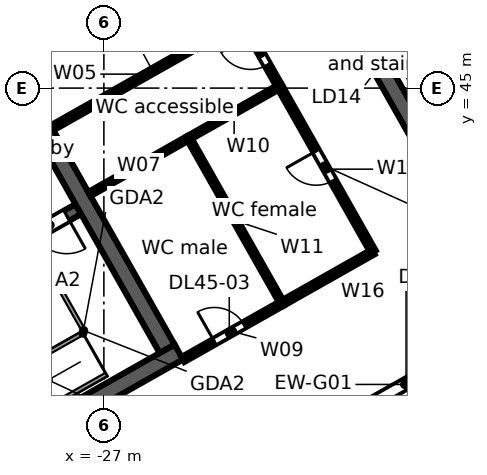
"""IFC4 building model, lengths in metres.
Left out: names, types, materials, properties, quantities, classifications, styles, units other than length and angle.
Written with IfcOpenShell. Run it as: python <this file> out.ifc"""

import sys

from ifc_helpers import new_model, si_unit, direction, frame, frame_2d, origin, place, context, subcontext, project, spatial, rectangle, extrude, element, fill, save


model = new_model("IFC4")
c1 = context("Model", 3, precision=1e-05, world=origin(), true_north=direction((0.0, 1.0)))
c2 = subcontext(c1, "Body", "Model", "MODEL_VIEW")
j1 = project(units=[si_unit("LENGTHUNIT", "METRE"), si_unit("PLANEANGLEUNIT", "RADIAN")], contexts=[c1])
p1 = place(None, origin())
s1 = spatial("IfcSite", under=j1, at=p1, CompositionType="ELEMENT")
p2 = place(p1, origin())
s2 = spatial("IfcBuilding", under=s1, at=p2, CompositionType="ELEMENT")
p3 = place(p2, frame((0.0, 0.0, 207.5)))
s3 = spatial("IfcBuildingStorey", under=s2, at=p3, CompositionType="ELEMENT", Elevation=207.5)
p4 = place(p3, frame((-0.046, 47.974, 0.0), z_axis=(0.0, 0.0, 1.0), x_axis=(-0.870356579543, -0.492421998337, 0.0)))
e1 = element("IfcWall", 1, at=p4, inside=s3, PredefinedType="STANDARD", context=c2, shape_type="SweptSolid", body=[
    extrude(rectangle(XDim=43.754, YDim=0.25, at=frame_2d((21.877, 0.0))), origin(), (0.0, 0.0, 1.0), 3.62),
])
p5 = place(p4, frame((41.061, 0.0, 0.8)))
e2 = element("IfcOpeningElement", 2, at=p5, cuts=e1, PredefinedType="OPENING", context=c2, shape_type="SweptSolid", body=[
    extrude(rectangle(XDim=2.4, YDim=2.2, at=frame_2d((1.2, 1.1))), frame((0.0, 0.135, 0.0), z_axis=(0.0, -1.0, 0.0), x_axis=(1.0, 0.0, 0.0)), (0.0, 0.0, 1.0), 0.27),
])
p6 = place(p4, frame((38.443, 0.0, 0.0)))
e3 = element("IfcOpeningElement", 3, at=p6, cuts=e1, PredefinedType="OPENING", context=c2, shape_type="SweptSolid", body=[
    extrude(rectangle(XDim=1.8, YDim=2.4, at=frame_2d((0.9, 1.2))), frame((0.0, 0.135, 0.0), z_axis=(0.0, -1.0, 0.0), x_axis=(1.0, 0.0, 0.0)), (0.0, 0.0, 1.0), 0.27),
])
p7 = place(p4, frame((35.225, 0.0, 0.8)))
e4 = element("IfcOpeningElement", 4, at=p7, cuts=e1, PredefinedType="OPENING", context=c2, shape_type="SweptSolid", body=[
    extrude(rectangle(XDim=2.4, YDim=2.2, at=frame_2d((1.2, 1.1))), frame((0.0, 0.135, 0.0), z_axis=(0.0, -1.0, 0.0), x_axis=(1.0, 0.0, 0.0)), (0.0, 0.0, 1.0), 0.27),
])
p8 = place(p4, frame((32.307, 0.0, 0.8)))
e5 = element("IfcOpeningElement", 5, at=p8, cuts=e1, PredefinedType="OPENING", context=c2, shape_type="SweptSolid", body=[
    extrude(rectangle(XDim=2.4, YDim=2.2, at=frame_2d((1.2, 1.1))), frame((0.0, 0.135, 0.0), z_axis=(0.0, -1.0, 0.0), x_axis=(1.0, 0.0, 0.0)), (0.0, 0.0, 1.0), 0.27),
])
p9 = place(p4, frame((29.688, 0.0, 0.0)))
e6 = element("IfcOpeningElement", 6, at=p9, cuts=e1, PredefinedType="OPENING", context=c2, shape_type="SweptSolid", body=[
    extrude(rectangle(XDim=1.8, YDim=2.4, at=frame_2d((0.9, 1.2))), frame((0.0, 0.135, 0.0), z_axis=(0.0, -1.0, 0.0), x_axis=(1.0, 0.0, 0.0)), (0.0, 0.0, 1.0), 0.27),
])
p10 = place(p4, frame((26.47, 0.0, 0.8)))
e7 = element("IfcOpeningElement", 7, at=p10, cuts=e1, PredefinedType="OPENING", context=c2, shape_type="SweptSolid", body=[
    extrude(rectangle(XDim=2.4, YDim=2.2, at=frame_2d((1.2, 1.1))), frame((0.0, 0.135, 0.0), z_axis=(0.0, -1.0, 0.0), x_axis=(1.0, 0.0, 0.0)), (0.0, 0.0, 1.0), 0.27),
])
p11 = place(p4, frame((23.552, 0.0, 0.8)))
e8 = element("IfcOpeningElement", 8, at=p11, cuts=e1, PredefinedType="OPENING", context=c2, shape_type="SweptSolid", body=[
    extrude(rectangle(XDim=2.4, YDim=2.2, at=frame_2d((1.2, 1.1))), frame((0.0, 0.135, 0.0), z_axis=(0.0, -1.0, 0.0), x_axis=(1.0, 0.0, 0.0)), (0.0, 0.0, 1.0), 0.27),
])
p12 = place(p4, frame((20.934, 0.0, 0.0)))
e9 = element("IfcOpeningElement", 9, at=p12, cuts=e1, PredefinedType="OPENING", context=c2, shape_type="SweptSolid", body=[
    extrude(rectangle(XDim=1.8, YDim=2.4, at=frame_2d((0.9, 1.2))), frame((0.0, 0.135, 0.0), z_axis=(0.0, -1.0, 0.0), x_axis=(1.0, 0.0, 0.0)), (0.0, 0.0, 1.0), 0.27),
])
p13 = place(p4, frame((17.716, 0.0, 0.8)))
e10 = element("IfcOpeningElement", 10, at=p13, cuts=e1, PredefinedType="OPENING", context=c2, shape_type="SweptSolid", body=[
    extrude(rectangle(XDim=2.4, YDim=2.2, at=frame_2d((1.2, 1.1))), frame((0.0, 0.135, 0.0), z_axis=(0.0, -1.0, 0.0), x_axis=(1.0, 0.0, 0.0)), (0.0, 0.0, 1.0), 0.27),
])
p14 = place(p4, frame((14.798, 0.0, 0.8)))
e11 = element("IfcOpeningElement", 11, at=p14, cuts=e1, PredefinedType="OPENING", context=c2, shape_type="SweptSolid", body=[
    extrude(rectangle(XDim=2.4, YDim=2.2, at=frame_2d((1.2, 1.1))), frame((0.0, 0.135, 0.0), z_axis=(0.0, -1.0, 0.0), x_axis=(1.0, 0.0, 0.0)), (0.0, 0.0, 1.0), 0.27),
])
p15 = place(p4, frame((12.179, 0.0, 0.0)))
e12 = element("IfcOpeningElement", 12, at=p15, cuts=e1, PredefinedType="OPENING", context=c2, shape_type="SweptSolid", body=[
    extrude(rectangle(XDim=1.8, YDim=2.4, at=frame_2d((0.9, 1.2))), frame((0.0, 0.135, 0.0), z_axis=(0.0, -1.0, 0.0), x_axis=(1.0, 0.0, 0.0)), (0.0, 0.0, 1.0), 0.27),
])
p16 = place(p4, frame((8.961, 0.0, 0.8)))
e13 = element("IfcOpeningElement", 13, at=p16, cuts=e1, PredefinedType="OPENING", context=c2, shape_type="SweptSolid", body=[
    extrude(rectangle(XDim=2.4, YDim=2.2, at=frame_2d((1.2, 1.1))), frame((0.0, 0.135, 0.0), z_axis=(0.0, -1.0, 0.0), x_axis=(1.0, 0.0, 0.0)), (0.0, 0.0, 1.0), 0.27),
])
p17 = place(p4, frame((6.043, 0.0, 0.8)))
e14 = element("IfcOpeningElement", 14, at=p17, cuts=e1, PredefinedType="OPENING", context=c2, shape_type="SweptSolid", body=[
    extrude(rectangle(XDim=2.4, YDim=2.2, at=frame_2d((1.2, 1.1))), frame((0.0, 0.135, 0.0), z_axis=(0.0, -1.0, 0.0), x_axis=(1.0, 0.0, 0.0)), (0.0, 0.0, 1.0), 0.27),
])
p18 = place(p4, frame((3.425, 0.0, 0.0)))
e15 = element("IfcOpeningElement", 15, at=p18, cuts=e1, PredefinedType="OPENING", context=c2, shape_type="SweptSolid", body=[
    extrude(rectangle(XDim=1.8, YDim=2.4, at=frame_2d((0.9, 1.2))), frame((0.0, 0.135, 0.0), z_axis=(0.0, -1.0, 0.0), x_axis=(1.0, 0.0, 0.0)), (0.0, 0.0, 1.0), 0.27),
])
p19 = place(p4, frame((0.207, 0.0, 0.8)))
e16 = element("IfcOpeningElement", 16, at=p19, cuts=e1, PredefinedType="OPENING", context=c2, shape_type="SweptSolid", body=[
    extrude(rectangle(XDim=2.4, YDim=2.2, at=frame_2d((1.2, 1.1))), frame((0.0, 0.135, 0.0), z_axis=(0.0, -1.0, 0.0), x_axis=(1.0, 0.0, 0.0)), (0.0, 0.0, 1.0), 0.27),
])
p20 = place(p3, frame((-58.732, 38.771, 0.0), z_axis=(0.0, 0.0, 1.0), x_axis=(0.870354824205, 0.492425100887, 0.0)))
e17 = element("IfcWall", 17, at=p20, inside=s3, PredefinedType="STANDARD", context=c2, shape_type="SweptSolid", body=[
    extrude(rectangle(XDim=64.006, YDim=0.25, at=frame_2d((32.003, 0.0))), origin(), (0.0, 0.0, 1.0), 3.62),
])
p21 = place(p20, frame((61.259, 0.0, 0.8)))
e18 = element("IfcOpeningElement", 18, at=p21, cuts=e17, PredefinedType="OPENING", context=c2, shape_type="SweptSolid", body=[
    extrude(rectangle(XDim=2.4, YDim=2.2, at=frame_2d((1.2, 1.1))), frame((0.0, 0.135, 0.0), z_axis=(0.0, -1.0, 0.0), x_axis=(1.0, 0.0, 0.0)), (0.0, 0.0, 1.0), 0.27),
])
p22 = place(p20, frame((58.216, 0.0, 0.8)))
e19 = element("IfcOpeningElement", 19, at=p22, cuts=e17, PredefinedType="OPENING", context=c2, shape_type="SweptSolid", body=[
    extrude(rectangle(XDim=2.4, YDim=2.2, at=frame_2d((1.2, 1.1))), frame((0.0, 0.135, 0.0), z_axis=(0.0, -1.0, 0.0), x_axis=(1.0, 0.0, 0.0)), (0.0, 0.0, 1.0), 0.27),
])
p23 = place(p20, frame((55.173, 0.0, 0.8)))
e20 = element("IfcOpeningElement", 20, at=p23, cuts=e17, PredefinedType="OPENING", context=c2, shape_type="SweptSolid", body=[
    extrude(rectangle(XDim=2.4, YDim=2.2, at=frame_2d((1.2, 1.1))), frame((0.0, 0.135, 0.0), z_axis=(0.0, -1.0, 0.0), x_axis=(1.0, 0.0, 0.0)), (0.0, 0.0, 1.0), 0.27),
])
p24 = place(p20, frame((52.129, 0.0, 0.8)))
e21 = element("IfcOpeningElement", 21, at=p24, cuts=e17, PredefinedType="OPENING", context=c2, shape_type="SweptSolid", body=[
    extrude(rectangle(XDim=2.4, YDim=2.2, at=frame_2d((1.2, 1.1))), frame((0.0, 0.135, 0.0), z_axis=(0.0, -1.0, 0.0), x_axis=(1.0, 0.0, 0.0)), (0.0, 0.0, 1.0), 0.27),
])
p25 = place(p20, frame((49.086, 0.0, 0.8)))
e22 = element("IfcOpeningElement", 22, at=p25, cuts=e17, PredefinedType="OPENING", context=c2, shape_type="SweptSolid", body=[
    extrude(rectangle(XDim=2.4, YDim=2.2, at=frame_2d((1.2, 1.1))), frame((0.0, 0.135, 0.0), z_axis=(0.0, -1.0, 0.0), x_axis=(1.0, 0.0, 0.0)), (0.0, 0.0, 1.0), 0.27),
])
p26 = place(p20, frame((46.043, 0.0, 0.8)))
e23 = element("IfcOpeningElement", 23, at=p26, cuts=e17, PredefinedType="OPENING", context=c2, shape_type="SweptSolid", body=[
    extrude(rectangle(XDim=2.4, YDim=2.2, at=frame_2d((1.2, 1.1))), frame((0.0, 0.135, 0.0), z_axis=(0.0, -1.0, 0.0), x_axis=(1.0, 0.0, 0.0)), (0.0, 0.0, 1.0), 0.27),
])
p27 = place(p20, frame((43.0, 0.0, 0.8)))
e24 = element("IfcOpeningElement", 24, at=p27, cuts=e17, PredefinedType="OPENING", context=c2, shape_type="SweptSolid", body=[
    extrude(rectangle(XDim=2.4, YDim=2.2, at=frame_2d((1.2, 1.1))), frame((0.0, 0.135, 0.0), z_axis=(0.0, -1.0, 0.0), x_axis=(1.0, 0.0, 0.0)), (0.0, 0.0, 1.0), 0.27),
])
p28 = place(p20, frame((39.956, 0.0, 0.8)))
e25 = element("IfcOpeningElement", 25, at=p28, cuts=e17, PredefinedType="OPENING", context=c2, shape_type="SweptSolid", body=[
    extrude(rectangle(XDim=2.4, YDim=2.2, at=frame_2d((1.2, 1.1))), frame((0.0, 0.135, 0.0), z_axis=(0.0, -1.0, 0.0), x_axis=(1.0, 0.0, 0.0)), (0.0, 0.0, 1.0), 0.27),
])
p29 = place(p20, frame((36.913, 0.0, 0.8)))
e26 = element("IfcOpeningElement", 26, at=p29, cuts=e17, PredefinedType="OPENING", context=c2, shape_type="SweptSolid", body=[
    extrude(rectangle(XDim=2.4, YDim=2.2, at=frame_2d((1.2, 1.1))), frame((0.0, 0.135, 0.0), z_axis=(0.0, -1.0, 0.0), x_axis=(1.0, 0.0, 0.0)), (0.0, 0.0, 1.0), 0.27),
])
p30 = place(p20, frame((33.87, 0.0, 0.8)))
e27 = element("IfcOpeningElement", 27, at=p30, cuts=e17, PredefinedType="OPENING", context=c2, shape_type="SweptSolid", body=[
    extrude(rectangle(XDim=2.4, YDim=2.2, at=frame_2d((1.2, 1.1))), frame((0.0, 0.135, 0.0), z_axis=(0.0, -1.0, 0.0), x_axis=(1.0, 0.0, 0.0)), (0.0, 0.0, 1.0), 0.27),
])
p31 = place(p20, frame((30.826, 0.0, 0.8)))
e28 = element("IfcOpeningElement", 28, at=p31, cuts=e17, PredefinedType="OPENING", context=c2, shape_type="SweptSolid", body=[
    extrude(rectangle(XDim=2.4, YDim=2.2, at=frame_2d((1.2, 1.1))), frame((0.0, 0.135, 0.0), z_axis=(0.0, -1.0, 0.0), x_axis=(1.0, 0.0, 0.0)), (0.0, 0.0, 1.0), 0.27),
])
p32 = place(p20, frame((27.783, 0.0, 0.8)))
e29 = element("IfcOpeningElement", 29, at=p32, cuts=e17, PredefinedType="OPENING", context=c2, shape_type="SweptSolid", body=[
    extrude(rectangle(XDim=2.4, YDim=2.2, at=frame_2d((1.2, 1.1))), frame((0.0, 0.135, 0.0), z_axis=(0.0, -1.0, 0.0), x_axis=(1.0, 0.0, 0.0)), (0.0, 0.0, 1.0), 0.27),
])
p33 = place(p20, frame((24.74, 0.0, 0.8)))
e30 = element("IfcOpeningElement", 30, at=p33, cuts=e17, PredefinedType="OPENING", context=c2, shape_type="SweptSolid", body=[
    extrude(rectangle(XDim=2.4, YDim=2.2, at=frame_2d((1.2, 1.1))), frame((0.0, 0.135, 0.0), z_axis=(0.0, -1.0, 0.0), x_axis=(1.0, 0.0, 0.0)), (0.0, 0.0, 1.0), 0.27),
])
p34 = place(p20, frame((21.696, 0.0, 0.8)))
e31 = element("IfcOpeningElement", 31, at=p34, cuts=e17, PredefinedType="OPENING", context=c2, shape_type="SweptSolid", body=[
    extrude(rectangle(XDim=2.4, YDim=2.2, at=frame_2d((1.2, 1.1))), frame((0.0, 0.135, 0.0), z_axis=(0.0, -1.0, 0.0), x_axis=(1.0, 0.0, 0.0)), (0.0, 0.0, 1.0), 0.27),
])
p35 = place(p20, frame((18.653, 0.0, 0.8)))
e32 = element("IfcOpeningElement", 32, at=p35, cuts=e17, PredefinedType="OPENING", context=c2, shape_type="SweptSolid", body=[
    extrude(rectangle(XDim=2.4, YDim=2.2, at=frame_2d((1.2, 1.1))), frame((0.0, 0.135, 0.0), z_axis=(0.0, -1.0, 0.0), x_axis=(1.0, 0.0, 0.0)), (0.0, 0.0, 1.0), 0.27),
])
p36 = place(p20, frame((15.61, 0.0, 0.8)))
e33 = element("IfcOpeningElement", 33, at=p36, cuts=e17, PredefinedType="OPENING", context=c2, shape_type="SweptSolid", body=[
    extrude(rectangle(XDim=2.4, YDim=2.2, at=frame_2d((1.2, 1.1))), frame((0.0, 0.135, 0.0), z_axis=(0.0, -1.0, 0.0), x_axis=(1.0, 0.0, 0.0)), (0.0, 0.0, 1.0), 0.27),
])
p37 = place(p20, frame((12.567, 0.0, 0.8)))
e34 = element("IfcOpeningElement", 34, at=p37, cuts=e17, PredefinedType="OPENING", context=c2, shape_type="SweptSolid", body=[
    extrude(rectangle(XDim=2.4, YDim=2.2, at=frame_2d((1.2, 1.1))), frame((0.0, 0.135, 0.0), z_axis=(0.0, -1.0, 0.0), x_axis=(1.0, 0.0, 0.0)), (0.0, 0.0, 1.0), 0.27),
])
p38 = place(p20, frame((9.523, 0.0, 0.8)))
e35 = element("IfcOpeningElement", 35, at=p38, cuts=e17, PredefinedType="OPENING", context=c2, shape_type="SweptSolid", body=[
    extrude(rectangle(XDim=2.4, YDim=2.2, at=frame_2d((1.2, 1.1))), frame((0.0, 0.135, 0.0), z_axis=(0.0, -1.0, 0.0), x_axis=(1.0, 0.0, 0.0)), (0.0, 0.0, 1.0), 0.27),
])
p39 = place(p20, frame((6.48, 0.0, 0.8)))
e36 = element("IfcOpeningElement", 36, at=p39, cuts=e17, PredefinedType="OPENING", context=c2, shape_type="SweptSolid", body=[
    extrude(rectangle(XDim=2.4, YDim=2.2, at=frame_2d((1.2, 1.1))), frame((0.0, 0.135, 0.0), z_axis=(0.0, -1.0, 0.0), x_axis=(1.0, 0.0, 0.0)), (0.0, 0.0, 1.0), 0.27),
])
p40 = place(p20, frame((3.437, 0.0, 0.8)))
e37 = element("IfcOpeningElement", 37, at=p40, cuts=e17, PredefinedType="OPENING", context=c2, shape_type="SweptSolid", body=[
    extrude(rectangle(XDim=2.4, YDim=2.2, at=frame_2d((1.2, 1.1))), frame((0.0, 0.135, 0.0), z_axis=(0.0, -1.0, 0.0), x_axis=(1.0, 0.0, 0.0)), (0.0, 0.0, 1.0), 0.27),
])
p41 = place(p20, frame((0.393, 0.0, 0.8)))
e38 = element("IfcOpeningElement", 38, at=p41, cuts=e17, PredefinedType="OPENING", context=c2, shape_type="SweptSolid", body=[
    extrude(rectangle(XDim=2.4, YDim=2.2, at=frame_2d((1.2, 1.1))), frame((0.0, 0.135, 0.0), z_axis=(0.0, -1.0, 0.0), x_axis=(1.0, 0.0, 0.0)), (0.0, 0.0, 1.0), 0.27),
])
p42 = place(p3, frame((-39.825, 29.684, 0.0), z_axis=(0.0, 0.0, 1.0), x_axis=(0.870353598469, 0.492427267353, 0.0)))
e39 = element("IfcWall", 39, at=p42, inside=s3, PredefinedType="SOLIDWALL", context=c2, shape_type="SweptSolid", body=[
    extrude(rectangle(XDim=17.0, YDim=0.45, at=frame_2d((8.5, 0.0))), origin(), (0.0, 0.0, 1.0), 3.62),
])
p43 = place(p42, frame((7.2, 0.0, 0.0)))
e40 = element("IfcOpeningElement", 40, at=p43, cuts=e39, PredefinedType="OPENING", context=c2, shape_type="SweptSolid", body=[
    extrude(rectangle(XDim=1.2, YDim=2.1, at=frame_2d((0.6, 1.05))), frame((0.0, 0.235, 0.0), z_axis=(0.0, -1.0, 0.0), x_axis=(1.0, 0.0, 0.0)), (0.0, 0.0, 1.0), 0.47),
])
p44 = place(p3, frame((-34.245, 38.097, 0.0), z_axis=(0.0, 0.0, 1.0), x_axis=(0.870360409231, 0.492415229297, 0.0)))
e41 = element("IfcWall", 41, at=p44, inside=s3, PredefinedType="SOLIDWALL", context=c2, shape_type="SweptSolid", body=[
    extrude(rectangle(XDim=7.55, YDim=0.3, at=frame_2d((3.775, 0.0))), origin(), (0.0, 0.0, 1.0), 3.62),
])
p45 = place(p44, frame((6.2, 0.0, 0.0)))
e42 = element("IfcOpeningElement", 42, at=p45, cuts=e41, PredefinedType="OPENING", context=c2, shape_type="SweptSolid", body=[
    extrude(rectangle(XDim=1.0, YDim=2.1, at=frame_2d((0.5, 1.05))), frame((0.0, 0.16, 0.0), z_axis=(0.0, -1.0, 0.0), x_axis=(1.0, 0.0, 0.0)), (0.0, 0.0, 1.0), 0.32),
])
p46 = place(p3, frame((-31.787, 49.542, 0.0), z_axis=(0.0, 0.0, 1.0), x_axis=(0.492421378713, -0.870356930107, 0.0)))
e43 = element("IfcWall", 43, at=p46, inside=s3, PredefinedType="SOLIDWALL", context=c2, shape_type="SweptSolid", body=[
    extrude(rectangle(XDim=13.1, YDim=0.45, at=frame_2d((6.55, 0.0))), origin(), (0.0, 0.0, 1.0), 3.62),
])
p47 = place(p3, frame((-24.353, 53.747, 0.0), z_axis=(0.0, 0.0, 1.0), x_axis=(0.492435496286, -0.870348942665, 0.0)))
e44 = element("IfcWall", 44, at=p47, inside=s3, PredefinedType="SOLIDWALL", context=c2, shape_type="SweptSolid", body=[
    extrude(rectangle(XDim=13.1, YDim=0.45, at=frame_2d((6.55, 0.0))), origin(), (0.0, 0.0, 1.0), 3.62),
])
p48 = place(p3, frame((-29.35, 45.692, 0.0), z_axis=(0.0, 0.0, 1.0), x_axis=(0.870294630003, 0.492531478169, 0.0)))
e45 = element("IfcWall", 45, at=p48, inside=s3, PredefinedType="PARTITIONING", context=c2, shape_type="SweptSolid", body=[
    extrude(rectangle(XDim=5.75, YDim=0.125, at=frame_2d((2.875, 0.0))), origin(), (0.0, 0.0, 1.0), 3.62),
])
p49 = place(p3, frame((-28.366, 43.952, 0.0), z_axis=(0.0, 0.0, 1.0), x_axis=(0.870398309195, 0.492348233825, 0.0)))
e46 = element("IfcWall", 46, at=p49, inside=s3, PredefinedType="PARTITIONING", context=c2, shape_type="SweptSolid", body=[
    extrude(rectangle(XDim=5.75, YDim=0.15, at=frame_2d((2.875, 0.0))), origin(), (0.0, 0.0, 1.0), 2.892),
])
p50 = place(p3, frame((-27.381, 42.211, 0.0), z_axis=(0.0, 0.0, 1.0), x_axis=(0.870388475779, 0.492365617434, 0.0)))
e47 = element("IfcWall", 47, at=p50, inside=s3, PredefinedType="PARTITIONING", context=c2, shape_type="SweptSolid", body=[
    extrude(rectangle(XDim=3.0, YDim=0.125, at=frame_2d((1.5, 0.0))), origin(), (0.0, 0.0, 1.0), 2.892),
])
p51 = place(p3, frame((-24.919, 37.859, 0.0), z_axis=(0.0, 0.0, 1.0), x_axis=(0.870368744559, 0.492400496034, 0.0)))
e48 = element("IfcWall", 48, at=p51, inside=s3, PredefinedType="PARTITIONING", context=c2, shape_type="SweptSolid", body=[
    extrude(rectangle(XDim=3.0, YDim=0.15, at=frame_2d((1.5, 0.0))), origin(), (0.0, 0.0, 1.0), 2.892),
])
p52 = place(p51, frame((0.95, 0.0, 0.0)))
e49 = element("IfcOpeningElement", 49, at=p52, cuts=e48, PredefinedType="OPENING", context=c2, shape_type="SweptSolid", body=[
    extrude(rectangle(XDim=0.9, YDim=2.1, at=frame_2d((0.45, 1.05))), frame((0.0, 0.085, 0.0), z_axis=(0.0, -1.0, 0.0), x_axis=(1.0, 0.0, 0.0)), (0.0, 0.0, 1.0), 0.17),
])
p53 = place(p3, frame((-24.77, 43.688, 0.0), z_axis=(0.0, 0.0, 1.0), x_axis=(0.870430549821, 0.492291232848, 0.0)))
e50 = element("IfcWall", 50, at=p53, inside=s3, PredefinedType="PARTITIONING", context=c2, shape_type="SweptSolid", body=[
    extrude(rectangle(XDim=2.75, YDim=0.125, at=frame_2d((1.375, 0.0))), origin(), (0.0, 0.0, 1.0), 3.62),
])
p54 = place(p3, frame((-24.77, 43.688, 0.0), z_axis=(0.0, 0.0, 1.0), x_axis=(0.492369352746, -0.870386362759, 0.0)))
e51 = element("IfcWall", 51, at=p54, inside=s3, PredefinedType="PARTITIONING", context=c2, shape_type="SweptSolid", body=[
    extrude(rectangle(XDim=5.0, YDim=0.125, at=frame_2d((2.5, 0.0))), origin(), (0.0, 0.0, 1.0), 3.62),
])
p55 = place(p3, frame((-23.361, 46.783, 0.0), z_axis=(0.0, 0.0, 1.0), x_axis=(0.492467412326, -0.870330884088, 0.0)))
e52 = element("IfcWall", 52, at=p55, inside=s3, PredefinedType="PARTITIONING", context=c2, shape_type="SweptSolid", body=[
    extrude(rectangle(XDim=2.0, YDim=0.15, at=frame_2d((1.0, 0.0))), origin(), (0.0, 0.0, 1.0), 2.892),
])
p56 = place(p55, frame((0.45, 0.0, 0.0)))
e53 = element("IfcOpeningElement", 53, at=p56, cuts=e52, PredefinedType="OPENING", context=c2, shape_type="SweptSolid", body=[
    extrude(rectangle(XDim=0.9, YDim=2.1, at=frame_2d((0.45, 1.05))), frame((0.0, 0.085, 0.0), z_axis=(0.0, -1.0, 0.0), x_axis=(1.0, 0.0, 0.0)), (0.0, 0.0, 1.0), 0.17),
])
p57 = place(p3, frame((-22.376, 45.042, 0.0), z_axis=(0.0, 0.0, 1.0), x_axis=(0.49245306389, -0.870339002841, 0.0)))
e54 = element("IfcWall", 54, at=p57, inside=s3, PredefinedType="PARTITIONING", context=c2, shape_type="SweptSolid", body=[
    extrude(rectangle(XDim=4.999, YDim=0.15, at=frame_2d((2.5, 0.0))), origin(), (0.0, 0.0, 1.0), 3.62),
])
p58 = place(p57, frame((1.95, 0.0, 0.0)))
e55 = element("IfcOpeningElement", 55, at=p58, cuts=e54, PredefinedType="OPENING", context=c2, shape_type="SweptSolid", body=[
    extrude(rectangle(XDim=0.9, YDim=2.1, at=frame_2d((0.45, 1.05))), frame((0.0, 0.085, 0.0), z_axis=(0.0, -1.0, 0.0), x_axis=(1.0, 0.0, 0.0)), (0.0, 0.0, 1.0), 0.17),
])
p59 = place(p3, frame((-22.308, 39.336, 0.0), z_axis=(0.0, 0.0, 1.0), x_axis=(0.870278389592, 0.492560173591, 0.0)))
e56 = element("IfcWall", 56, at=p59, inside=s3, PredefinedType="PARTITIONING", context=c2, shape_type="SweptSolid", body=[
    extrude(rectangle(XDim=2.751, YDim=0.15, at=frame_2d((1.375, 0.0))), origin(), (0.0, 0.0, 1.0), 3.62),
])
p60 = place(p12, origin())
e57 = element("IfcDoor", 57, at=p60, inside=s3, OperationType="DOUBLE_DOOR_SINGLE_SWING", PredefinedType="DOOR", context=c2, shape_type="SweptSolid", body=[
    extrude(rectangle(XDim=1.8, YDim=2.4, at=frame_2d((0.9, 1.2))), frame((0.0, 0.025, 0.0), z_axis=(0.0, -1.0, 0.0), x_axis=(1.0, 0.0, 0.0)), (0.0, 0.0, 1.0), 0.05),
])
fill(e9, e57)
p61 = place(p45, frame((1.0, 0.0, 0.0), z_axis=(0.0, 0.0, 1.0), x_axis=(-1.0, 0.0, 0.0)))
e58 = element("IfcDoor", 58, at=p61, inside=s3, OperationType="SINGLE_SWING_LEFT", PredefinedType="DOOR", context=c2, shape_type="SweptSolid", body=[
    extrude(rectangle(XDim=1.0, YDim=2.1, at=frame_2d((0.5, 1.05))), frame((0.0, 0.025, 0.0), z_axis=(0.0, -1.0, 0.0), x_axis=(1.0, 0.0, 0.0)), (0.0, 0.0, 1.0), 0.05),
])
fill(e42, e58)
p62 = place(p52, origin())
e59 = element("IfcDoor", 59, at=p62, inside=s3, OperationType="SINGLE_SWING_LEFT", PredefinedType="DOOR", context=c2, shape_type="SweptSolid", body=[
    extrude(rectangle(XDim=0.9, YDim=2.1, at=frame_2d((0.45, 1.05))), frame((0.0, 0.025, 0.0), z_axis=(0.0, -1.0, 0.0), x_axis=(1.0, 0.0, 0.0)), (0.0, 0.0, 1.0), 0.05),
])
fill(e49, e59)
p63 = place(p58, frame((0.9, 0.0, 0.0), z_axis=(0.0, 0.0, 1.0), x_axis=(-1.0, 0.0, 0.0)))
e60 = element("IfcDoor", 60, at=p63, inside=s3, OperationType="SINGLE_SWING_RIGHT", PredefinedType="DOOR", context=c2, shape_type="SweptSolid", body=[
    extrude(rectangle(XDim=0.9, YDim=2.1, at=frame_2d((0.45, 1.05))), frame((0.0, 0.025, 0.0), z_axis=(0.0, -1.0, 0.0), x_axis=(1.0, 0.0, 0.0)), (0.0, 0.0, 1.0), 0.05),
])
fill(e55, e60)
p64 = place(p56, frame((0.9, 0.0, 0.0), z_axis=(0.0, 0.0, 1.0), x_axis=(-1.0, 0.0, 0.0)))
e61 = element("IfcDoor", 61, at=p64, inside=s3, OperationType="SINGLE_SWING_RIGHT", PredefinedType="DOOR", context=c2, shape_type="SweptSolid", body=[
    extrude(rectangle(XDim=0.9, YDim=2.1, at=frame_2d((0.45, 1.05))), frame((0.0, 0.025, 0.0), z_axis=(0.0, -1.0, 0.0), x_axis=(1.0, 0.0, 0.0)), (0.0, 0.0, 1.0), 0.05),
])
fill(e53, e61)
save(model, sys.argv[1])
